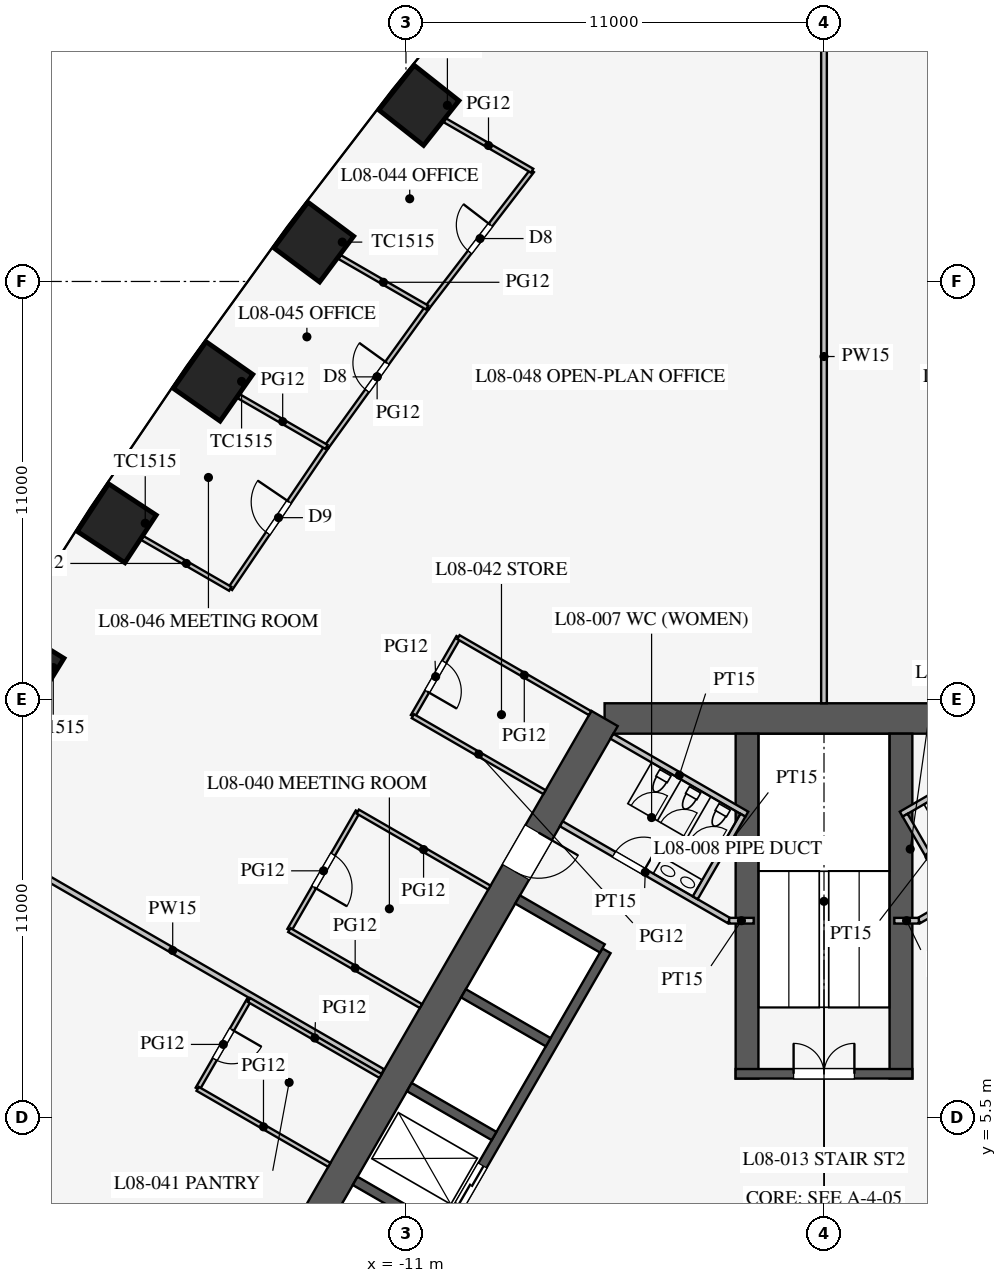
"""IFC4 building model, lengths in metres.
Left out: names, types, materials, properties, quantities, classifications, styles, units other than length and angle.
Written with IfcOpenShell. Run it as: python <this file> out.ifc"""

import sys

from ifc_helpers import new_model, si_unit, direction, frame, frame_2d, origin, origin_2d, place, context, subcontext, project, spatial, rectangle, extrude, element, fill, save


model = new_model("IFC4")
c1 = context("Model", 3, precision=1e-05, world=origin(), true_north=direction((0.0, 1.0)))
c2 = subcontext(c1, "Body", "Model", "MODEL_VIEW")
j1 = project(units=[si_unit("LENGTHUNIT", "METRE"), si_unit("PLANEANGLEUNIT", "RADIAN")], contexts=[c1])
p1 = place(None, origin())
s1 = spatial("IfcSite", under=j1, at=p1, CompositionType="ELEMENT")
p2 = place(p1, origin())
s2 = spatial("IfcBuilding", under=s1, at=p2, CompositionType="ELEMENT")
p3 = place(p2, frame((0.0, 0.0, 37.5)))
s3 = spatial("IfcBuildingStorey", under=s2, at=p3, CompositionType="ELEMENT", Elevation=37.5)
for number, where, z_axis, x_axis in (
    (1, (-10.66, 32.135, 0.0), (0.0, 0.0, 1.0), (-0.62, -0.784, 0.0)),
    (2, (-13.426, 28.536, 0.0), (0.0, 0.0, 1.0), (-0.597, -0.802, 0.0)),
    (3, (-16.076, 24.87, 0.0), (0.0, 0.0, 1.0), (-0.574, -0.819, 0.0)),
    (4, (-18.611, 21.137, 0.0), (0.0, 0.0, 1.0), (-0.549, -0.836, 0.0)),
    (5, (-21.031, 17.339, 0.0), (0.0, 0.0, 1.0), (-0.525, -0.851, 0.0)),
):
    element("IfcColumn", number, at=place(p3, frame(where, z_axis=z_axis, x_axis=x_axis)), inside=s3, PredefinedType="COLUMN", context=c2, shape_type="SweptSolid", body=[
        extrude(rectangle(XDim=1.5, YDim=1.5, at=origin_2d()), origin(), (0.0, 0.0, 1.0), 4.2),
    ])
p4 = place(p3, frame((5.773, 16.0, 0.0), z_axis=(0.0, 0.0, 1.0), x_axis=(-1.0, 0.0, 0.0)))
e6 = element("IfcWall", 6, at=p4, inside=s3, PredefinedType="SHEAR", context=c2, shape_type="SweptSolid", body=[
    extrude(rectangle(XDim=11.547, YDim=0.8, at=frame_2d((5.773, 0.0))), origin(), (0.0, 0.0, 1.0), 4.2),
])
p5 = place(p3, frame((-5.773, 16.0, 0.0), z_axis=(0.0, 0.0, 1.0), x_axis=(-0.500002442456, -0.866023993627, 0.0)))
e7 = element("IfcWall", 7, at=p5, inside=s3, PredefinedType="SHEAR", context=c2, shape_type="SweptSolid", body=[
    extrude(rectangle(XDim=21.939, YDim=0.8, at=frame_2d((10.97, 0.0))), origin(), (0.0, 0.0, 1.0), 4.2),
])
p6 = place(p5, frame((17.27, 0.0, 0.0)))
e8 = element("IfcOpeningElement", 8, at=p6, cuts=e7, PredefinedType="OPENING", context=c2, shape_type="SweptSolid", body=[
    extrude(rectangle(XDim=1.2, YDim=2.1, at=frame_2d((0.6, 1.05))), frame((0.0, 0.41, 0.0), z_axis=(0.0, -1.0, 0.0), x_axis=(1.0, 0.0, 0.0)), (0.0, 0.0, 1.0), 0.82),
])
p7 = place(p5, frame((3.47, 0.0, 0.0)))
e9 = element("IfcOpeningElement", 9, at=p7, cuts=e7, PredefinedType="OPENING", context=c2, shape_type="SweptSolid", body=[
    extrude(rectangle(XDim=1.2, YDim=2.1, at=frame_2d((0.6, 1.05))), frame((0.0, 0.41, 0.0), z_axis=(0.0, -1.0, 0.0), x_axis=(1.0, 0.0, 0.0)), (0.0, 0.0, 1.0), 0.82),
])
p8 = place(p3, frame((-5.724, 9.886, 0.0), z_axis=(0.0, 0.0, 1.0), x_axis=(-0.500001763848, -0.866024385424, 0.0)))
e10 = element("IfcWall", 10, at=p8, inside=s3, PredefinedType="SHEAR", context=c2, shape_type="SweptSolid", body=[
    extrude(rectangle(XDim=11.4, YDim=0.25, at=frame_2d((5.7, 0.0))), origin(), (0.0, 0.0, 1.0), 4.2),
])
p9 = place(p8, frame((6.525, 0.0, 0.0)))
e11 = element("IfcOpeningElement", 11, at=p9, cuts=e10, PredefinedType="OPENING", context=c2, shape_type="SweptSolid", body=[
    extrude(rectangle(XDim=1.2, YDim=2.2, at=frame_2d((0.6, 1.1))), frame((0.0, 0.135, 0.0), z_axis=(0.0, -1.0, 0.0), x_axis=(1.0, 0.0, 0.0)), (0.0, 0.0, 1.0), 0.27),
])
p10 = place(p8, frame((9.375, 0.0, 0.0)))
e12 = element("IfcOpeningElement", 12, at=p10, cuts=e10, PredefinedType="OPENING", context=c2, shape_type="SweptSolid", body=[
    extrude(rectangle(XDim=1.2, YDim=2.2, at=frame_2d((0.6, 1.1))), frame((0.0, 0.135, 0.0), z_axis=(0.0, -1.0, 0.0), x_axis=(1.0, 0.0, 0.0)), (0.0, 0.0, 1.0), 0.27),
])
p11 = place(p3, frame((-5.832, 9.949, 0.0), z_axis=(0.0, 0.0, 1.0), x_axis=(-0.866029291668, 0.499993265928, 0.0)))
e13 = element("IfcWall", 13, at=p11, inside=s3, PredefinedType="SHEAR", context=c2, shape_type="SweptSolid", body=[
    extrude(rectangle(XDim=2.575, YDim=0.25, at=frame_2d((1.288, 0.0))), origin(), (0.0, 0.0, 1.0), 4.2),
])
for number, where, z_axis, x_axis in (
    (14, (-7.257, 7.481, 0.0), (0.0, 0.0, 1.0), (-0.866, 0.5, 0.0)),
    (15, (-8.682, 5.012, 0.0), (0.0, 0.0, 1.0), (-0.866, 0.5, 0.0)),
    (16, (-10.107, 2.544, 0.0), (0.0, 0.0, 1.0), (-0.866, 0.5, 0.0)),
):
    element("IfcWall", number, at=place(p3, frame(where, z_axis=z_axis, x_axis=x_axis)), inside=s3, PredefinedType="SHEAR", context=c2, shape_type="SweptSolid", body=[
        extrude(rectangle(XDim=2.575, YDim=0.25, at=frame_2d((1.288, 0.0))), origin(), (0.0, 0.0, 1.0), 4.2),
    ])
for number, where, z_axis, x_axis in (
    (17, (2.025, 6.525, 0.0), (0.0, 0.0, 1.0), (0.0, 1.0, 0.0)),
    (18, (-2.025, 6.525, 0.0), (0.0, 0.0, 1.0), (0.0, 1.0, 0.0)),
):
    element("IfcWall", number, at=place(p3, frame(where, z_axis=z_axis, x_axis=x_axis)), inside=s3, PredefinedType="SHEAR", context=c2, shape_type="SweptSolid", body=[
        extrude(rectangle(XDim=9.075, YDim=0.6, at=frame_2d((4.538, 0.0))), origin(), (0.0, 0.0, 1.0), 4.2),
    ])
p12 = place(p3, frame((2.325, 6.65, 0.0), z_axis=(0.0, 0.0, 1.0), x_axis=(-1.0, 0.0, 0.0)))
e19 = element("IfcWall", 19, at=p12, inside=s3, PredefinedType="SHEAR", context=c2, shape_type="SweptSolid", body=[
    extrude(rectangle(XDim=4.65, YDim=0.25, at=frame_2d((2.325, 0.0))), origin(), (0.0, 0.0, 1.0), 4.2),
])
p13 = place(p12, frame((1.525, 0.0, 0.0)))
e20 = element("IfcOpeningElement", 20, at=p13, cuts=e19, PredefinedType="OPENING", context=c2, shape_type="SweptSolid", body=[
    extrude(rectangle(XDim=1.6, YDim=2.1, at=frame_2d((0.8, 1.05))), frame((0.0, 0.135, 0.0), z_axis=(0.0, -1.0, 0.0), x_axis=(1.0, 0.0, 0.0)), (0.0, 0.0, 1.0), 0.27),
])
p14 = place(p3, frame((2.495, 10.678, 0.0), z_axis=(0.0, 0.0, 1.0), x_axis=(0.86602216432, 0.500005610874, 0.0)))
e21 = element("IfcWall", 21, at=p14, inside=s3, PredefinedType="PARTITIONING", context=c2, shape_type="SweptSolid", body=[
    extrude(rectangle(XDim=5.1, YDim=0.15, at=frame_2d((2.55, 0.0))), origin(), (0.0, 0.0, 1.0), 4.0),
])
p15 = place(p14, frame((1.3, 0.0, 0.0)))
e22 = element("IfcOpeningElement", 22, at=p15, cuts=e21, PredefinedType="OPENING", context=c2, shape_type="SweptSolid", body=[
    extrude(rectangle(XDim=0.9, YDim=2.1, at=frame_2d((0.45, 1.05))), frame((0.0, 0.085, 0.0), z_axis=(0.0, -1.0, 0.0), x_axis=(1.0, 0.0, 0.0)), (0.0, 0.0, 1.0), 0.17),
])
p16 = place(p3, frame((-2.495, 10.678, 0.0), z_axis=(0.0, 0.0, 1.0), x_axis=(-0.86602216432, 0.500005610874, 0.0)))
e23 = element("IfcWall", 23, at=p16, inside=s3, PredefinedType="PARTITIONING", context=c2, shape_type="SweptSolid", body=[
    extrude(rectangle(XDim=5.1, YDim=0.15, at=frame_2d((2.55, 0.0))), origin(), (0.0, 0.0, 1.0), 4.0),
])
p17 = place(p16, frame((2.6, 0.0, 0.0)))
e24 = element("IfcOpeningElement", 24, at=p17, cuts=e23, PredefinedType="OPENING", context=c2, shape_type="SweptSolid", body=[
    extrude(rectangle(XDim=0.9, YDim=2.1, at=frame_2d((0.45, 1.05))), frame((0.0, 0.085, 0.0), z_axis=(0.0, -1.0, 0.0), x_axis=(1.0, 0.0, 0.0)), (0.0, 0.0, 1.0), 0.17),
])
for number, where, z_axis, x_axis in (
    (25, (2.495, 10.678, 0.0), (0.0, 0.0, 1.0), (-1.0, 0.0, 0.0)),
    (26, (-2.495, 10.678, 0.0), (0.0, 0.0, 1.0), (1.0, 0.0, 0.0)),
):
    element("IfcWall", number, at=place(p3, frame(where, z_axis=z_axis, x_axis=x_axis)), inside=s3, PredefinedType="PARTITIONING", context=c2, shape_type="SweptSolid", body=[
        extrude(rectangle(XDim=0.645, YDim=0.15, at=frame_2d((0.323, 0.0))), origin(), (0.0, 0.0, 1.0), 4.0),
    ])
p18 = place(p3, frame((2.031, 13.482, 0.0), z_axis=(0.0, 0.0, 1.0), x_axis=(0.866050731258, 0.499956128963, 0.0)))
e27 = element("IfcWall", 27, at=p18, inside=s3, PredefinedType="PARTITIONING", context=c2, shape_type="SweptSolid", body=[
    extrude(rectangle(XDim=4.1, YDim=0.15, at=frame_2d((2.05, 0.0))), origin(), (0.0, 0.0, 1.0), 4.0),
])
p19 = place(p3, frame((3.389, 11.281, 0.0), z_axis=(0.0, 0.0, 1.0), x_axis=(-0.499989096993, 0.866031698547, 0.0)))
e28 = element("IfcWall", 28, at=p19, inside=s3, PredefinedType="PARTITIONING", context=c2, shape_type="SweptSolid", body=[
    extrude(rectangle(XDim=2.51, YDim=0.15, at=frame_2d((1.255, 0.0))), origin(), (0.0, 0.0, 1.0), 4.0),
])
p20 = place(p3, frame((-2.031, 13.482, 0.0), z_axis=(0.0, 0.0, 1.0), x_axis=(-0.866050731258, 0.499956128963, 0.0)))
e29 = element("IfcWall", 29, at=p20, inside=s3, PredefinedType="PARTITIONING", context=c2, shape_type="SweptSolid", body=[
    extrude(rectangle(XDim=4.1, YDim=0.15, at=frame_2d((2.05, 0.0))), origin(), (0.0, 0.0, 1.0), 4.0),
])
p21 = place(p3, frame((-3.389, 11.281, 0.0), z_axis=(0.0, 0.0, 1.0), x_axis=(0.499989096993, 0.866031698547, 0.0)))
e30 = element("IfcWall", 30, at=p21, inside=s3, PredefinedType="PARTITIONING", context=c2, shape_type="SweptSolid", body=[
    extrude(rectangle(XDim=2.51, YDim=0.15, at=frame_2d((1.255, 0.0))), origin(), (0.0, 0.0, 1.0), 4.0),
])
p22 = place(p3, frame((0.0, 16.4, 0.0), z_axis=(0.0, 0.0, 1.0), x_axis=(0.0, 1.0, 0.0)))
e31 = element("IfcWall", 31, at=p22, inside=s3, PredefinedType="PARTITIONING", context=c2, shape_type="SweptSolid", body=[
    extrude(rectangle(XDim=18.25, YDim=0.15, at=frame_2d((9.125, 0.0))), origin(), (0.0, 0.0, 1.0), 2.3),
])
p23 = place(p3, frame((-11.613, 6.705, 0.0), z_axis=(0.0, 0.0, 1.0), x_axis=(-0.86602785495, 0.499995754432, 0.0)))
e32 = element("IfcWall", 32, at=p23, inside=s3, PredefinedType="PARTITIONING", context=c2, shape_type="SweptSolid", body=[
    extrude(rectangle(XDim=12.759, YDim=0.15, at=frame_2d((6.379, 0.0))), origin(), (0.0, 0.0, 1.0), 3.2),
])
p24 = place(p3, frame((-15.131, 8.592, 0.0), z_axis=(0.0, 0.0, 1.0), x_axis=(-0.50000943426, -0.866019956843, 0.0)))
e33 = element("IfcWall", 33, at=p24, inside=s3, PredefinedType="PARTITIONING", context=c2, shape_type="SweptSolid", body=[
    extrude(rectangle(XDim=2.7, YDim=0.12, at=frame_2d((1.35, 0.0))), origin(), (0.0, 0.0, 1.0), 2.9),
])
p25 = place(p24, frame((0.9, 0.0, 0.15)))
e34 = element("IfcOpeningElement", 34, at=p25, cuts=e33, PredefinedType="OPENING", context=c2, shape_type="SweptSolid", body=[
    extrude(rectangle(XDim=0.9, YDim=2.1, at=frame_2d((0.45, 1.05))), frame((0.0, 0.07, 0.0), z_axis=(0.0, -1.0, 0.0), x_axis=(1.0, 0.0, 0.0)), (0.0, 0.0, 1.0), 0.14),
])
p26 = place(p3, frame((-9.619, 18.14, 0.0), z_axis=(0.0, 0.0, 1.0), x_axis=(-0.500001309137, -0.866024647952, 0.0)))
e35 = element("IfcWall", 35, at=p26, inside=s3, PredefinedType="PARTITIONING", context=c2, shape_type="SweptSolid", body=[
    extrude(rectangle(XDim=2.4, YDim=0.12, at=frame_2d((1.2, 0.0))), origin(), (0.0, 0.0, 1.0), 2.9),
])
p27 = place(p26, frame((0.75, 0.0, 0.15)))
e36 = element("IfcOpeningElement", 36, at=p27, cuts=e35, PredefinedType="OPENING", context=c2, shape_type="SweptSolid", body=[
    extrude(rectangle(XDim=0.9, YDim=2.1, at=frame_2d((0.45, 1.05))), frame((0.0, 0.07, 0.0), z_axis=(0.0, -1.0, 0.0), x_axis=(1.0, 0.0, 0.0)), (0.0, 0.0, 1.0), 0.14),
])
p28 = place(p3, frame((-12.269, 13.55, 0.0), z_axis=(0.0, 0.0, 1.0), x_axis=(-0.500012057535, -0.866018442252, 0.0)))
e37 = element("IfcWall", 37, at=p28, inside=s3, PredefinedType="PARTITIONING", context=c2, shape_type="SweptSolid", body=[
    extrude(rectangle(XDim=3.6, YDim=0.12, at=frame_2d((1.8, 0.0))), origin(), (0.0, 0.0, 1.0), 2.9),
])
p29 = place(p28, frame((1.3, 0.0, 0.15)))
e38 = element("IfcOpeningElement", 38, at=p29, cuts=e37, PredefinedType="OPENING", context=c2, shape_type="SweptSolid", body=[
    extrude(rectangle(XDim=1.0, YDim=2.1, at=frame_2d((0.5, 1.05))), frame((0.0, 0.07, 0.0), z_axis=(0.0, -1.0, 0.0), x_axis=(1.0, 0.0, 0.0)), (0.0, 0.0, 1.0), 0.14),
])
for number, where, z_axis, x_axis in (
    (39, (-11.667, 6.592, 0.0), (0.0, 0.0, 1.0), (-0.866, 0.5, 0.0)),
    (40, (-13.017, 4.253, 0.0), (0.0, 0.0, 1.0), (-0.866, 0.5, 0.0)),
    (41, (-6.155, 16.14, 0.0), (0.0, 0.0, 1.0), (-0.866, 0.5, 0.0)),
    (42, (-10.605, 8.432, 0.0), (0.0, 0.0, 1.0), (-0.866, 0.5, 0.0)),
    (43, (-8.805, 11.55, 0.0), (0.0, 0.0, 1.0), (-0.866, 0.5, 0.0)),
    (44, (-7.355, 14.061, 0.0), (0.0, 0.0, 1.0), (-0.866, 0.5, 0.0)),
):
    element("IfcWall", number, at=place(p3, frame(where, z_axis=z_axis, x_axis=x_axis)), inside=s3, PredefinedType="PARTITIONING", context=c2, shape_type="SweptSolid", body=[
        extrude(rectangle(XDim=4.0, YDim=0.12, at=frame_2d((2.0, 0.0))), origin(), (0.0, 0.0, 1.0), 2.9),
    ])
p30 = place(p3, frame((-13.091, 23.146, 0.0), z_axis=(0.0, 0.0, 1.0), x_axis=(-0.561512004239, -0.827468591002, 0.0)))
e45 = element("IfcWall", 45, at=p30, inside=s3, PredefinedType="PARTITIONING", context=c2, shape_type="SweptSolid", body=[
    extrude(rectangle(XDim=4.512, YDim=0.12, at=frame_2d((2.256, 0.0))), origin(), (0.0, 0.0, 1.0), 2.9),
])
p31 = place(p30, frame((1.75, 0.0, 0.15)))
e46 = element("IfcOpeningElement", 46, at=p31, cuts=e45, PredefinedType="OPENING", context=c2, shape_type="SweptSolid", body=[
    extrude(rectangle(XDim=1.0, YDim=2.1, at=frame_2d((0.5, 1.05))), frame((0.0, 0.07, 0.0), z_axis=(0.0, -1.0, 0.0), x_axis=(1.0, 0.0, 0.0)), (0.0, 0.0, 1.0), 0.14),
])
p32 = place(p3, frame((-10.443, 26.814, 0.0), z_axis=(0.0, 0.0, 1.0), x_axis=(-0.58534077607, -0.810787380187, 0.0)))
e47 = element("IfcWall", 47, at=p32, inside=s3, PredefinedType="PARTITIONING", context=c2, shape_type="SweptSolid", body=[
    extrude(rectangle(XDim=4.523, YDim=0.12, at=frame_2d((2.262, 0.0))), origin(), (0.0, 0.0, 1.0), 2.9),
])
p33 = place(p32, frame((1.8, 0.0, 0.15)))
e48 = element("IfcOpeningElement", 48, at=p33, cuts=e47, PredefinedType="OPENING", context=c2, shape_type="SweptSolid", body=[
    extrude(rectangle(XDim=0.9, YDim=2.1, at=frame_2d((0.45, 1.05))), frame((0.0, 0.07, 0.0), z_axis=(0.0, -1.0, 0.0), x_axis=(1.0, 0.0, 0.0)), (0.0, 0.0, 1.0), 0.14),
])
p34 = place(p3, frame((-7.679, 30.415, 0.0), z_axis=(0.0, 0.0, 1.0), x_axis=(-0.608818785139, -0.79330932609, 0.0)))
e49 = element("IfcWall", 49, at=p34, inside=s3, PredefinedType="PARTITIONING", context=c2, shape_type="SweptSolid", body=[
    extrude(rectangle(XDim=4.539, YDim=0.12, at=frame_2d((2.27, 0.0))), origin(), (0.0, 0.0, 1.0), 2.9),
])
p35 = place(p34, frame((1.8, 0.0, 0.15)))
e50 = element("IfcOpeningElement", 50, at=p35, cuts=e49, PredefinedType="OPENING", context=c2, shape_type="SweptSolid", body=[
    extrude(rectangle(XDim=0.9, YDim=2.1, at=frame_2d((0.45, 1.05))), frame((0.0, 0.07, 0.0), z_axis=(0.0, -1.0, 0.0), x_axis=(1.0, 0.0, 0.0)), (0.0, 0.0, 1.0), 0.14),
])
p36 = place(p3, frame((-13.091, 23.146, 0.0), z_axis=(0.0, 0.0, 1.0), x_axis=(-0.866023818221, 0.500002746266, 0.0)))
e51 = element("IfcWall", 51, at=p36, inside=s3, PredefinedType="PARTITIONING", context=c2, shape_type="SweptSolid", body=[
    extrude(rectangle(XDim=2.664, YDim=0.12, at=frame_2d((1.332, 0.0))), origin(), (0.0, 0.0, 1.0), 2.9),
])
p37 = place(p3, frame((-10.443, 26.814, 0.0), z_axis=(0.0, 0.0, 1.0), x_axis=(-0.866031171652, 0.499990009627, 0.0)))
e52 = element("IfcWall", 52, at=p37, inside=s3, PredefinedType="PARTITIONING", context=c2, shape_type="SweptSolid", body=[
    extrude(rectangle(XDim=2.659, YDim=0.12, at=frame_2d((1.33, 0.0))), origin(), (0.0, 0.0, 1.0), 2.9),
])
p38 = place(p3, frame((-7.679, 30.415, 0.0), z_axis=(0.0, 0.0, 1.0), x_axis=(-0.866026229868, 0.499998569178, 0.0)))
e53 = element("IfcWall", 53, at=p38, inside=s3, PredefinedType="PARTITIONING", context=c2, shape_type="SweptSolid", body=[
    extrude(rectangle(XDim=2.653, YDim=0.12, at=frame_2d((1.327, 0.0))), origin(), (0.0, 0.0, 1.0), 2.9),
])
p39 = place(p3, frame((-15.624, 19.413, 0.0), z_axis=(0.0, 0.0, 1.0), x_axis=(-0.866020974757, 0.500007671222, 0.0)))
e54 = element("IfcWall", 54, at=p39, inside=s3, PredefinedType="PARTITIONING", context=c2, shape_type="SweptSolid", body=[
    extrude(rectangle(XDim=2.667, YDim=0.12, at=frame_2d((1.334, 0.0))), origin(), (0.0, 0.0, 1.0), 2.9),
])
p40 = place(p17, frame((0.9, 0.0, 0.0), z_axis=(0.0, 0.0, 1.0), x_axis=(-1.0, 0.0, 0.0)))
e55 = element("IfcDoor", 55, at=p40, inside=s3, OperationType="SINGLE_SWING_RIGHT", PredefinedType="DOOR", context=c2, shape_type="SweptSolid", body=[
    extrude(rectangle(XDim=0.9, YDim=2.1, at=frame_2d((0.45, 1.05))), frame((0.0, 0.025, 0.0), z_axis=(0.0, -1.0, 0.0), x_axis=(1.0, 0.0, 0.0)), (0.0, 0.0, 1.0), 0.05),
])
fill(e24, e55)
p41 = place(p13, frame((1.6, 0.0, 0.0), z_axis=(0.0, 0.0, 1.0), x_axis=(-1.0, 0.0, 0.0)))
e56 = element("IfcDoor", 56, at=p41, inside=s3, OperationType="DOUBLE_DOOR_SINGLE_SWING", PredefinedType="DOOR", context=c2, shape_type="SweptSolid", body=[
    extrude(rectangle(XDim=1.6, YDim=2.1, at=frame_2d((0.8, 1.05))), frame((0.0, 0.025, 0.0), z_axis=(0.0, -1.0, 0.0), x_axis=(1.0, 0.0, 0.0)), (0.0, 0.0, 1.0), 0.05),
])
fill(e20, e56)
p42 = place(p7, origin())
e57 = element("IfcDoor", 57, at=p42, inside=s3, OperationType="SINGLE_SWING_LEFT", PredefinedType="DOOR", context=c2, shape_type="SweptSolid", body=[
    extrude(rectangle(XDim=1.2, YDim=2.1, at=frame_2d((0.6, 1.05))), frame((0.0, 0.025, 0.0), z_axis=(0.0, -1.0, 0.0), x_axis=(1.0, 0.0, 0.0)), (0.0, 0.0, 1.0), 0.05),
])
fill(e9, e57)
p43 = place(p29, origin())
e58 = element("IfcDoor", 58, at=p43, inside=s3, OperationType="SINGLE_SWING_RIGHT", PredefinedType="DOOR", context=c2, shape_type="SweptSolid", body=[
    extrude(rectangle(XDim=1.0, YDim=2.1, at=frame_2d((0.5, 1.05))), frame((0.0, 0.025, 0.0), z_axis=(0.0, -1.0, 0.0), x_axis=(1.0, 0.0, 0.0)), (0.0, 0.0, 1.0), 0.05),
])
fill(e38, e58)
p44 = place(p25, origin())
e59 = element("IfcDoor", 59, at=p44, inside=s3, OperationType="SINGLE_SWING_LEFT", PredefinedType="DOOR", context=c2, shape_type="SweptSolid", body=[
    extrude(rectangle(XDim=0.9, YDim=2.1, at=frame_2d((0.45, 1.05))), frame((0.0, 0.025, 0.0), z_axis=(0.0, -1.0, 0.0), x_axis=(1.0, 0.0, 0.0)), (0.0, 0.0, 1.0), 0.05),
])
fill(e34, e59)
p45 = place(p27, origin())
e60 = element("IfcDoor", 60, at=p45, inside=s3, OperationType="SINGLE_SWING_RIGHT", PredefinedType="DOOR", context=c2, shape_type="SweptSolid", body=[
    extrude(rectangle(XDim=0.9, YDim=2.1, at=frame_2d((0.45, 1.05))), frame((0.0, 0.025, 0.0), z_axis=(0.0, -1.0, 0.0), x_axis=(1.0, 0.0, 0.0)), (0.0, 0.0, 1.0), 0.05),
])
fill(e36, e60)
p46 = place(p35, frame((0.9, 0.0, 0.0), z_axis=(0.0, 0.0, 1.0), x_axis=(-1.0, 0.0, 0.0)))
e61 = element("IfcDoor", 61, at=p46, inside=s3, OperationType="SINGLE_SWING_RIGHT", PredefinedType="DOOR", context=c2, shape_type="SweptSolid", body=[
    extrude(rectangle(XDim=0.9, YDim=2.1, at=frame_2d((0.45, 1.05))), frame((0.0, 0.025, 0.0), z_axis=(0.0, -1.0, 0.0), x_axis=(1.0, 0.0, 0.0)), (0.0, 0.0, 1.0), 0.05),
])
fill(e50, e61)
p47 = place(p33, frame((0.9, 0.0, 0.0), z_axis=(0.0, 0.0, 1.0), x_axis=(-1.0, 0.0, 0.0)))
e62 = element("IfcDoor", 62, at=p47, inside=s3, OperationType="SINGLE_SWING_RIGHT", PredefinedType="DOOR", context=c2, shape_type="SweptSolid", body=[
    extrude(rectangle(XDim=0.9, YDim=2.1, at=frame_2d((0.45, 1.05))), frame((0.0, 0.025, 0.0), z_axis=(0.0, -1.0, 0.0), x_axis=(1.0, 0.0, 0.0)), (0.0, 0.0, 1.0), 0.05),
])
fill(e48, e62)
p48 = place(p31, frame((1.0, 0.0, 0.0), z_axis=(0.0, 0.0, 1.0), x_axis=(-1.0, 0.0, 0.0)))
e63 = element("IfcDoor", 63, at=p48, inside=s3, OperationType="SINGLE_SWING_RIGHT", PredefinedType="DOOR", context=c2, shape_type="SweptSolid", body=[
    extrude(rectangle(XDim=1.0, YDim=2.1, at=frame_2d((0.5, 1.05))), frame((0.0, 0.025, 0.0), z_axis=(0.0, -1.0, 0.0), x_axis=(1.0, 0.0, 0.0)), (0.0, 0.0, 1.0), 0.05),
])
fill(e46, e63)
p49 = place(p9, origin())
e64 = element("IfcDoor", 64, at=p49, inside=s3, OperationType="DOUBLE_DOOR_SLIDING", PredefinedType="DOOR", context=c2, shape_type="SweptSolid", body=[
    extrude(rectangle(XDim=1.2, YDim=2.2, at=frame_2d((0.6, 1.1))), frame((0.0, 0.025, 0.0), z_axis=(0.0, -1.0, 0.0), x_axis=(1.0, 0.0, 0.0)), (0.0, 0.0, 1.0), 0.05),
])
fill(e11, e64)
save(model, sys.argv[1])
